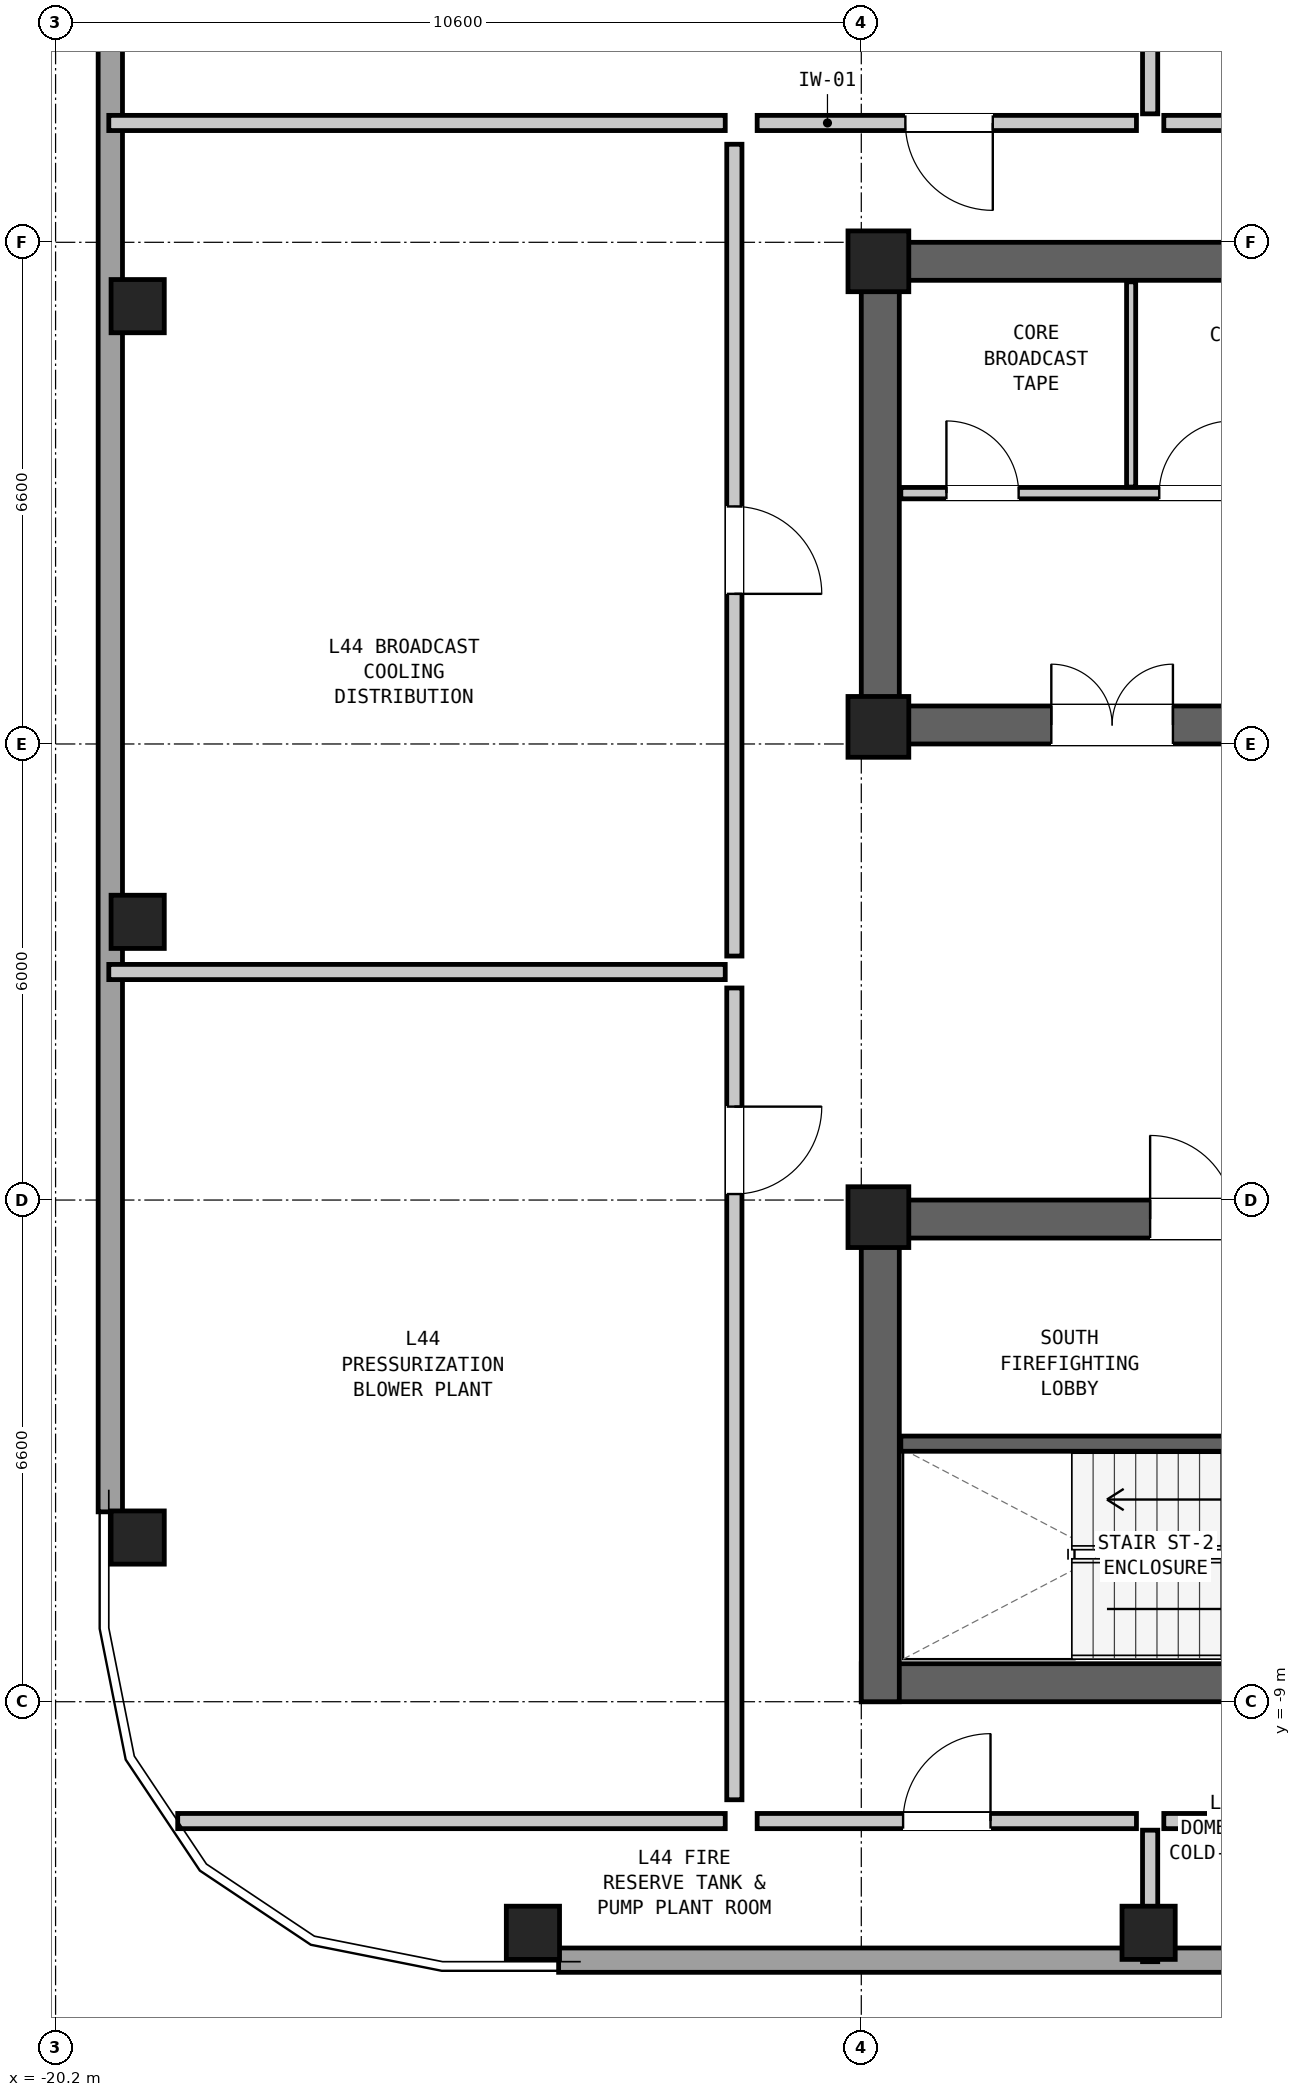
"""IFC4 building model, lengths in metres.
Left out: names, types, materials, properties, quantities, classifications, styles, units other than length and angle.
Written with IfcOpenShell. Run it as: python <this file> out.ifc"""

import sys

from ifc_helpers import new_model, si_unit, direction, frame, frame_2d, origin, origin_2d, place, context, subcontext, project, spatial, rectangle, hollow_rectangle, extrude, element, fill, save


model = new_model("IFC4")
c1 = context("Model", 3, precision=1e-05, world=origin(), true_north=direction((0.0, 1.0)))
c2 = subcontext(c1, "Body", "Model", "MODEL_VIEW")
j1 = project(units=[si_unit("LENGTHUNIT", "METRE"), si_unit("PLANEANGLEUNIT", "RADIAN")], contexts=[c1])
p1 = place(None, origin())
s1 = spatial("IfcSite", under=j1, at=p1, CompositionType="ELEMENT")
p2 = place(p1, origin())
s2 = spatial("IfcBuilding", under=s1, at=p2, CompositionType="ELEMENT")
p3 = place(p2, frame((0.0, 0.0, 151.8)))
s3 = spatial("IfcBuildingStorey", under=s2, at=p3, CompositionType="ELEMENT", Elevation=151.8)
p4 = place(p3, frame((-9.6, 9.95, 0.0), z_axis=(0.0, 0.0, 1.0), x_axis=(1.0, 0.0, 0.0)))
e1 = element("IfcWall", 1, at=p4, inside=s3, PredefinedType="SHEAR", context=c2, shape_type="SweptSolid", body=[
    extrude(rectangle(XDim=19.2, YDim=0.5, at=frame_2d((9.6, 0.0))), origin(), (0.0, 0.0, 1.0), 4.35),
])
p5 = place(p3, frame((-9.6, 3.85, 0.0), z_axis=(0.0, 0.0, 1.0), x_axis=(1.0, 0.0, 0.0)))
e2 = element("IfcWall", 2, at=p5, inside=s3, PredefinedType="SHEAR", context=c2, shape_type="SweptSolid", body=[
    extrude(rectangle(XDim=19.2, YDim=0.5, at=frame_2d((9.6, 0.0))), origin(), (0.0, 0.0, 1.0), 4.35),
])
p6 = place(p5, frame((14.2, 0.0, 0.0)))
e3 = element("IfcOpeningElement", 3, at=p6, cuts=e2, PredefinedType="OPENING", context=c2, shape_type="SweptSolid", body=[
    extrude(rectangle(XDim=1.1, YDim=2.08, at=frame_2d((0.55, 1.04))), frame((0.0, 0.262, 0.0), z_axis=(0.0, -1.0, 0.0), x_axis=(1.0, 0.0, 0.0)), (0.0, 0.0, 1.0), 0.524),
])
p7 = place(p5, frame((8.2, 0.0, 0.0)))
e4 = element("IfcOpeningElement", 4, at=p7, cuts=e2, PredefinedType="OPENING", context=c2, shape_type="SweptSolid", body=[
    extrude(rectangle(XDim=1.15, YDim=2.1, at=frame_2d((0.575, 1.05))), frame((0.0, 0.262, 0.0), z_axis=(0.0, -1.0, 0.0), x_axis=(1.0, 0.0, 0.0)), (0.0, 0.0, 1.0), 0.524),
])
p8 = place(p5, frame((2.5, 0.0, 0.0)))
e5 = element("IfcOpeningElement", 5, at=p8, cuts=e2, PredefinedType="OPENING", context=c2, shape_type="SweptSolid", body=[
    extrude(rectangle(XDim=1.6, YDim=2.12, at=frame_2d((0.8, 1.06))), frame((0.0, 0.262, 0.0), z_axis=(0.0, -1.0, 0.0), x_axis=(1.0, 0.0, 0.0)), (0.0, 0.0, 1.0), 0.524),
])
p9 = place(p3, frame((-9.35, 3.6, 0.0), z_axis=(0.0, 0.0, 1.0), x_axis=(0.0, 1.0, 0.0)))
e6 = element("IfcWall", 6, at=p9, inside=s3, PredefinedType="SHEAR", context=c2, shape_type="SweptSolid", body=[
    extrude(rectangle(XDim=6.6, YDim=0.5, at=frame_2d((3.3, 0.0))), origin(), (0.0, 0.0, 1.0), 4.35),
])
p10 = place(p3, frame((-9.6, -8.75, 0.0), z_axis=(0.0, 0.0, 1.0), x_axis=(1.0, 0.0, 0.0)))
e7 = element("IfcWall", 7, at=p10, inside=s3, PredefinedType="SHEAR", context=c2, shape_type="SweptSolid", body=[
    extrude(rectangle(XDim=19.2, YDim=0.5, at=frame_2d((9.6, 0.0))), origin(), (0.0, 0.0, 1.0), 4.35),
])
p11 = place(p3, frame((-9.6, -2.65, 0.0), z_axis=(0.0, 0.0, 1.0), x_axis=(1.0, 0.0, 0.0)))
e8 = element("IfcWall", 8, at=p11, inside=s3, PredefinedType="SHEAR", context=c2, shape_type="SweptSolid", body=[
    extrude(rectangle(XDim=19.2, YDim=0.5, at=frame_2d((9.6, 0.0))), origin(), (0.0, 0.0, 1.0), 4.35),
])
p12 = place(p11, frame((3.8, 0.0, 0.0)))
e9 = element("IfcOpeningElement", 9, at=p12, cuts=e8, PredefinedType="OPENING", context=c2, shape_type="SweptSolid", body=[
    extrude(rectangle(XDim=1.1, YDim=2.08, at=frame_2d((0.55, 1.04))), frame((0.0, 0.262, 0.0), z_axis=(0.0, -1.0, 0.0), x_axis=(1.0, 0.0, 0.0)), (0.0, 0.0, 1.0), 0.524),
])
p13 = place(p11, frame((12.2, 0.0, 0.0)))
e10 = element("IfcOpeningElement", 10, at=p13, cuts=e8, PredefinedType="OPENING", context=c2, shape_type="SweptSolid", body=[
    extrude(rectangle(XDim=1.6, YDim=2.12, at=frame_2d((0.8, 1.06))), frame((0.0, 0.262, 0.0), z_axis=(0.0, -1.0, 0.0), x_axis=(1.0, 0.0, 0.0)), (0.0, 0.0, 1.0), 0.524),
])
p14 = place(p11, frame((16.5, 0.0, 0.0)))
e11 = element("IfcOpeningElement", 11, at=p14, cuts=e8, PredefinedType="OPENING", context=c2, shape_type="SweptSolid", body=[
    extrude(rectangle(XDim=0.9, YDim=2.05, at=frame_2d((0.45, 1.025))), frame((0.0, 0.262, 0.0), z_axis=(0.0, -1.0, 0.0), x_axis=(1.0, 0.0, 0.0)), (0.0, 0.0, 1.0), 0.524),
])
p15 = place(p3, frame((-9.35, -9.0, 0.0), z_axis=(0.0, 0.0, 1.0), x_axis=(0.0, 1.0, 0.0)))
e12 = element("IfcWall", 12, at=p15, inside=s3, PredefinedType="SHEAR", context=c2, shape_type="SweptSolid", body=[
    extrude(rectangle(XDim=6.6, YDim=0.5, at=frame_2d((3.3, 0.0))), origin(), (0.0, 0.0, 1.0), 4.35),
])
for number, where, z_axis, x_axis in (
    (13, (-13.92, -12.04, 0.0), (0.0, 0.0, 1.0), (1.0, 0.0, 0.0)),
    (14, (-5.82, -12.04, 0.0), (0.0, 0.0, 1.0), (1.0, 0.0, 0.0)),
    (15, (-19.12, 9.36, 0.0), (0.0, 0.0, 1.0), (0.0, 1.0, 0.0)),
    (16, (-19.12, 1.26, 0.0), (0.0, 0.0, 1.0), (0.0, 1.0, 0.0)),
    (17, (-19.12, -6.84, 0.0), (0.0, 0.0, 1.0), (0.0, 1.0, 0.0)),
):
    element("IfcColumn", number, at=place(p3, frame(where, z_axis=z_axis, x_axis=x_axis)), inside=s3, PredefinedType="COLUMN", context=c2, shape_type="SweptSolid", body=[
        extrude(hollow_rectangle(XDim=0.7, YDim=0.7, WallThickness=0.045, at=origin_2d()), origin(), (0.0, 0.0, 1.0), 4.35),
    ])
for number, where, z_axis, x_axis in (
    (18, (-9.375, 9.95, 0.0), (0.0, 0.0, 1.0), (1.0, 0.0, 0.0)),
    (19, (-9.375, 3.825, 0.0), (0.0, 0.0, 1.0), (1.0, 0.0, 0.0)),
    (20, (-9.375, -2.625, 0.0), (0.0, 0.0, 1.0), (1.0, 0.0, 0.0)),
):
    element("IfcColumn", number, at=place(p3, frame(where, z_axis=z_axis, x_axis=x_axis)), inside=s3, PredefinedType="COLUMN", context=c2, shape_type="SweptSolid", body=[
        extrude(rectangle(XDim=0.8, YDim=0.8, at=origin_2d()), origin(), (0.0, 0.0, 1.0), 4.35),
    ])
for number, where, z_axis, x_axis in (
    (21, (10.042, -12.4, 0.0), (0.0, 0.0, 1.0), (-1.0, 0.0, 0.0)),
    (22, (-19.48, -6.502, 0.0), (0.0, 0.0, 1.0), (0.0, 1.0, 0.0)),
):
    element("IfcWall", number, at=place(p3, frame(where, z_axis=z_axis, x_axis=x_axis)), inside=s3, PredefinedType="SOLIDWALL", context=c2, shape_type="SweptSolid", body=[
        extrude(rectangle(XDim=23.624, YDim=0.32, at=frame_2d((11.812, 0.0))), origin(), (0.0, 0.0, 1.0), 2.31),
    ])
p16 = place(p3, frame((-9.08, 6.9, 0.0), z_axis=(0.0, 0.0, 1.0), x_axis=(1.0, 0.0, 0.0)))
e23 = element("IfcWall", 23, at=p16, inside=s3, PredefinedType="PARTITIONING", context=c2, shape_type="SweptSolid", body=[
    extrude(rectangle(XDim=5.96, YDim=0.15, at=frame_2d((2.98, 0.0))), origin(), (0.0, 0.0, 1.0), 4.13),
])
p17 = place(p16, frame((0.6, 0.0, 0.0)))
e24 = element("IfcOpeningElement", 24, at=p17, cuts=e23, PredefinedType="OPENING", context=c2, shape_type="SweptSolid", body=[
    extrude(rectangle(XDim=0.95, YDim=2.1, at=frame_2d((0.475, 1.05))), frame((0.0, 0.087, 0.0), z_axis=(0.0, -1.0, 0.0), x_axis=(1.0, 0.0, 0.0)), (0.0, 0.0, 1.0), 0.174),
])
p18 = place(p16, frame((3.4, 0.0, 0.0)))
e25 = element("IfcOpeningElement", 25, at=p18, cuts=e23, PredefinedType="OPENING", context=c2, shape_type="SweptSolid", body=[
    extrude(rectangle(XDim=0.95, YDim=2.1, at=frame_2d((0.475, 1.05))), frame((0.0, 0.087, 0.0), z_axis=(0.0, -1.0, 0.0), x_axis=(1.0, 0.0, 0.0)), (0.0, 0.0, 1.0), 0.174),
])
p19 = place(p3, frame((-6.05, 6.98, 0.0), z_axis=(0.0, 0.0, 1.0), x_axis=(0.0, 1.0, 0.0)))
e26 = element("IfcWall", 26, at=p19, inside=s3, PredefinedType="PARTITIONING", context=c2, shape_type="SweptSolid", body=[
    extrude(rectangle(XDim=2.7, YDim=0.12, at=frame_2d((1.35, 0.0))), origin(), (0.0, 0.0, 1.0), 4.13),
])
p20 = place(p3, frame((-9.08, -5.605, 0.0), z_axis=(0.0, 0.0, 1.0), x_axis=(1.0, 0.0, 0.0)))
e27 = element("IfcWall", 27, at=p20, inside=s3, PredefinedType="SHEAR", context=c2, shape_type="SweptSolid", body=[
    extrude(rectangle(XDim=6.72, YDim=0.2, at=frame_2d((3.36, 0.0))), origin(), (0.0, 0.0, 1.0), 4.13),
])
p21 = place(p20, frame((5.45, 0.0, 0.0)))
e28 = element("IfcOpeningElement", 28, at=p21, cuts=e27, PredefinedType="OPENING", context=c2, shape_type="SweptSolid", body=[
    extrude(rectangle(XDim=1.05, YDim=2.08, at=frame_2d((0.525, 1.04))), frame((0.0, 0.112, 0.0), z_axis=(0.0, -1.0, 0.0), x_axis=(1.0, 0.0, 0.0)), (0.0, 0.0, 1.0), 0.224),
])
p22 = place(p3, frame((-5.98, 11.77, 0.0), z_axis=(0.0, 0.0, 1.0), x_axis=(-1.0, 0.0, 0.0)))
e29 = element("IfcWall", 29, at=p22, inside=s3, PredefinedType="PARTITIONING", context=c2, shape_type="SweptSolid", body=[
    extrude(rectangle(XDim=4.99, YDim=0.2, at=frame_2d((2.495, 0.0))), origin(), (0.0, 0.0, 1.0), 4.13),
])
p23 = place(p22, frame((1.89, 0.0, 0.0)))
e30 = element("IfcOpeningElement", 30, at=p23, cuts=e29, PredefinedType="OPENING", context=c2, shape_type="SweptSolid", body=[
    extrude(rectangle(XDim=1.15, YDim=2.1, at=frame_2d((0.575, 1.05))), frame((0.0, 0.112, 0.0), z_axis=(0.0, -1.0, 0.0), x_axis=(1.0, 0.0, 0.0)), (0.0, 0.0, 1.0), 0.224),
])
p24 = place(p3, frame((-5.8, 11.89, 0.0), z_axis=(0.0, 0.0, 1.0), x_axis=(0.0, 1.0, 0.0)))
e31 = element("IfcWall", 31, at=p24, inside=s3, PredefinedType="PARTITIONING", context=c2, shape_type="SweptSolid", body=[
    extrude(rectangle(XDim=11.15, YDim=0.2, at=frame_2d((5.575, 0.0))), origin(), (0.0, 0.0, 1.0), 3.647),
])
p25 = place(p3, frame((-0.53, 11.77, 0.0), z_axis=(0.0, 0.0, 1.0), x_axis=(-1.0, 0.0, 0.0)))
e32 = element("IfcWall", 32, at=p25, inside=s3, PredefinedType="PARTITIONING", context=c2, shape_type="SweptSolid", body=[
    extrude(rectangle(XDim=5.09, YDim=0.2, at=frame_2d((2.545, 0.0))), origin(), (0.0, 0.0, 1.0), 4.13),
])
p26 = place(p25, frame((1.97, 0.0, 0.0)))
e33 = element("IfcOpeningElement", 33, at=p26, cuts=e32, PredefinedType="OPENING", context=c2, shape_type="SweptSolid", body=[
    extrude(rectangle(XDim=1.15, YDim=2.1, at=frame_2d((0.575, 1.05))), frame((0.0, 0.112, 0.0), z_axis=(0.0, -1.0, 0.0), x_axis=(1.0, 0.0, 0.0)), (0.0, 0.0, 1.0), 0.224),
])
p27 = place(p3, frame((-10.97, -10.57, 0.0), z_axis=(0.0, 0.0, 1.0), x_axis=(1.0, 0.0, 0.0)))
e34 = element("IfcWall", 34, at=p27, inside=s3, PredefinedType="PARTITIONING", context=c2, shape_type="SweptSolid", body=[
    extrude(rectangle(XDim=4.99, YDim=0.2, at=frame_2d((2.495, 0.0))), origin(), (0.0, 0.0, 1.0), 4.13),
])
p28 = place(p27, frame((1.92, 0.0, 0.0)))
e35 = element("IfcOpeningElement", 35, at=p28, cuts=e34, PredefinedType="OPENING", context=c2, shape_type="SweptSolid", body=[
    extrude(rectangle(XDim=1.15, YDim=2.1, at=frame_2d((0.575, 1.05))), frame((0.0, 0.112, 0.0), z_axis=(0.0, -1.0, 0.0), x_axis=(1.0, 0.0, 0.0)), (0.0, 0.0, 1.0), 0.224),
])
p29 = place(p3, frame((-5.8, -12.42, 0.0), z_axis=(0.0, 0.0, 1.0), x_axis=(0.0, 1.0, 0.0)))
e36 = element("IfcWall", 36, at=p29, inside=s3, PredefinedType="PARTITIONING", context=c2, shape_type="SweptSolid", body=[
    extrude(rectangle(XDim=1.73, YDim=0.2, at=frame_2d((0.865, 0.0))), origin(), (0.0, 0.0, 1.0), 3.647),
])
p30 = place(p3, frame((-5.62, -10.57, 0.0), z_axis=(0.0, 0.0, 1.0), x_axis=(1.0, 0.0, 0.0)))
e37 = element("IfcWall", 37, at=p30, inside=s3, PredefinedType="PARTITIONING", context=c2, shape_type="SweptSolid", body=[
    extrude(rectangle(XDim=5.09, YDim=0.2, at=frame_2d((2.545, 0.0))), origin(), (0.0, 0.0, 1.0), 4.13),
])
p31 = place(p30, frame((1.99, 0.0, 0.0)))
e38 = element("IfcOpeningElement", 38, at=p31, cuts=e37, PredefinedType="OPENING", context=c2, shape_type="SweptSolid", body=[
    extrude(rectangle(XDim=1.15, YDim=2.1, at=frame_2d((0.575, 1.05))), frame((0.0, 0.112, 0.0), z_axis=(0.0, -1.0, 0.0), x_axis=(1.0, 0.0, 0.0)), (0.0, 0.0, 1.0), 0.224),
])
p32 = place(p3, frame((-19.5, 11.77, 0.0), z_axis=(0.0, 0.0, 1.0), x_axis=(1.0, 0.0, 0.0)))
e39 = element("IfcWall", 39, at=p32, inside=s3, PredefinedType="PARTITIONING", context=c2, shape_type="SweptSolid", body=[
    extrude(rectangle(XDim=8.11, YDim=0.2, at=frame_2d((4.055, 0.0))), origin(), (0.0, 0.0, 1.0), 4.13),
])
p33 = place(p3, frame((-18.593, -10.57, 0.0), z_axis=(0.0, 0.0, 1.0), x_axis=(1.0, 0.0, 0.0)))
e40 = element("IfcWall", 40, at=p33, inside=s3, PredefinedType="PARTITIONING", context=c2, shape_type="SweptSolid", body=[
    extrude(rectangle(XDim=7.203, YDim=0.2, at=frame_2d((3.602, 0.0))), origin(), (0.0, 0.0, 1.0), 4.13),
])
p34 = place(p3, frame((-19.5, 0.6, 0.0), z_axis=(0.0, 0.0, 1.0), x_axis=(1.0, 0.0, 0.0)))
e41 = element("IfcWall", 41, at=p34, inside=s3, PredefinedType="PARTITIONING", context=c2, shape_type="SweptSolid", body=[
    extrude(rectangle(XDim=8.11, YDim=0.2, at=frame_2d((4.055, 0.0))), origin(), (0.0, 0.0, 1.0), 2.31),
])
p35 = place(p3, frame((-11.27, 0.39, 0.0), z_axis=(0.0, 0.0, 1.0), x_axis=(0.0, -1.0, 0.0)))
e42 = element("IfcWall", 42, at=p35, inside=s3, PredefinedType="PARTITIONING", context=c2, shape_type="SweptSolid", body=[
    extrude(rectangle(XDim=10.68, YDim=0.2, at=frame_2d((5.34, 0.0))), origin(), (0.0, 0.0, 1.0), 4.13),
])
p36 = place(p35, frame((1.561, 0.0, 0.0)))
e43 = element("IfcOpeningElement", 43, at=p36, cuts=e42, PredefinedType="OPENING", context=c2, shape_type="SweptSolid", body=[
    extrude(rectangle(XDim=1.15, YDim=2.1, at=frame_2d((0.575, 1.05))), frame((0.0, 0.112, 0.0), z_axis=(0.0, -1.0, 0.0), x_axis=(1.0, 0.0, 0.0)), (0.0, 0.0, 1.0), 0.224),
])
p37 = place(p3, frame((-11.27, 11.49, 0.0), z_axis=(0.0, 0.0, 1.0), x_axis=(0.0, -1.0, 0.0)))
e44 = element("IfcWall", 44, at=p37, inside=s3, PredefinedType="PARTITIONING", context=c2, shape_type="SweptSolid", body=[
    extrude(rectangle(XDim=10.68, YDim=0.2, at=frame_2d((5.34, 0.0))), origin(), (0.0, 0.0, 1.0), 4.13),
])
p38 = place(p37, frame((4.765, 0.0, 0.0)))
e45 = element("IfcOpeningElement", 45, at=p38, cuts=e44, PredefinedType="OPENING", context=c2, shape_type="SweptSolid", body=[
    extrude(rectangle(XDim=1.15, YDim=2.1, at=frame_2d((0.575, 1.05))), frame((0.0, 0.112, 0.0), z_axis=(0.0, -1.0, 0.0), x_axis=(1.0, 0.0, 0.0)), (0.0, 0.0, 1.0), 0.224),
])
p39 = place(p8, origin())
e46 = element("IfcDoor", 46, at=p39, inside=s3, OperationType="DOUBLE_DOOR_SINGLE_SWING", PredefinedType="DOOR", context=c2, shape_type="SweptSolid", body=[
    extrude(rectangle(XDim=1.6, YDim=2.12, at=frame_2d((0.8, 1.06))), frame((0.0, 0.025, 0.0), z_axis=(0.0, -1.0, 0.0), x_axis=(1.0, 0.0, 0.0)), (0.0, 0.0, 1.0), 0.05),
])
fill(e5, e46)
p40 = place(p17, origin())
e47 = element("IfcDoor", 47, at=p40, inside=s3, OperationType="SINGLE_SWING_LEFT", PredefinedType="DOOR", context=c2, shape_type="SweptSolid", body=[
    extrude(rectangle(XDim=0.95, YDim=2.1, at=frame_2d((0.475, 1.05))), frame((0.0, 0.025, 0.0), z_axis=(0.0, -1.0, 0.0), x_axis=(1.0, 0.0, 0.0)), (0.0, 0.0, 1.0), 0.05),
])
fill(e24, e47)
p41 = place(p18, origin())
e48 = element("IfcDoor", 48, at=p41, inside=s3, OperationType="SINGLE_SWING_RIGHT", PredefinedType="DOOR", context=c2, shape_type="SweptSolid", body=[
    extrude(rectangle(XDim=0.95, YDim=2.1, at=frame_2d((0.475, 1.05))), frame((0.0, 0.025, 0.0), z_axis=(0.0, -1.0, 0.0), x_axis=(1.0, 0.0, 0.0)), (0.0, 0.0, 1.0), 0.05),
])
fill(e25, e48)
p42 = place(p12, origin())
e49 = element("IfcDoor", 49, at=p42, inside=s3, OperationType="SINGLE_SWING_LEFT", PredefinedType="DOOR", context=c2, shape_type="SweptSolid", body=[
    extrude(rectangle(XDim=1.1, YDim=2.08, at=frame_2d((0.55, 1.04))), frame((0.0, 0.025, 0.0), z_axis=(0.0, -1.0, 0.0), x_axis=(1.0, 0.0, 0.0)), (0.0, 0.0, 1.0), 0.05),
])
fill(e9, e49)
p43 = place(p23, origin())
e50 = element("IfcDoor", 50, at=p43, inside=s3, OperationType="SINGLE_SWING_LEFT", PredefinedType="DOOR", context=c2, shape_type="SweptSolid", body=[
    extrude(rectangle(XDim=1.15, YDim=2.1, at=frame_2d((0.575, 1.05))), frame((0.0, 0.025, 0.0), z_axis=(0.0, -1.0, 0.0), x_axis=(1.0, 0.0, 0.0)), (0.0, 0.0, 1.0), 0.05),
])
fill(e30, e50)
p44 = place(p28, origin())
e51 = element("IfcDoor", 51, at=p44, inside=s3, OperationType="SINGLE_SWING_RIGHT", PredefinedType="DOOR", context=c2, shape_type="SweptSolid", body=[
    extrude(rectangle(XDim=1.15, YDim=2.1, at=frame_2d((0.575, 1.05))), frame((0.0, 0.025, 0.0), z_axis=(0.0, -1.0, 0.0), x_axis=(1.0, 0.0, 0.0)), (0.0, 0.0, 1.0), 0.05),
])
fill(e35, e51)
p45 = place(p36, origin())
e52 = element("IfcDoor", 52, at=p45, inside=s3, OperationType="SINGLE_SWING_LEFT", PredefinedType="DOOR", context=c2, shape_type="SweptSolid", body=[
    extrude(rectangle(XDim=1.15, YDim=2.1, at=frame_2d((0.575, 1.05))), frame((0.0, 0.025, 0.0), z_axis=(0.0, -1.0, 0.0), x_axis=(1.0, 0.0, 0.0)), (0.0, 0.0, 1.0), 0.05),
])
fill(e43, e52)
p46 = place(p38, origin())
e53 = element("IfcDoor", 53, at=p46, inside=s3, OperationType="SINGLE_SWING_RIGHT", PredefinedType="DOOR", context=c2, shape_type="SweptSolid", body=[
    extrude(rectangle(XDim=1.15, YDim=2.1, at=frame_2d((0.575, 1.05))), frame((0.0, 0.025, 0.0), z_axis=(0.0, -1.0, 0.0), x_axis=(1.0, 0.0, 0.0)), (0.0, 0.0, 1.0), 0.05),
])
fill(e45, e53)
save(model, sys.argv[1])
